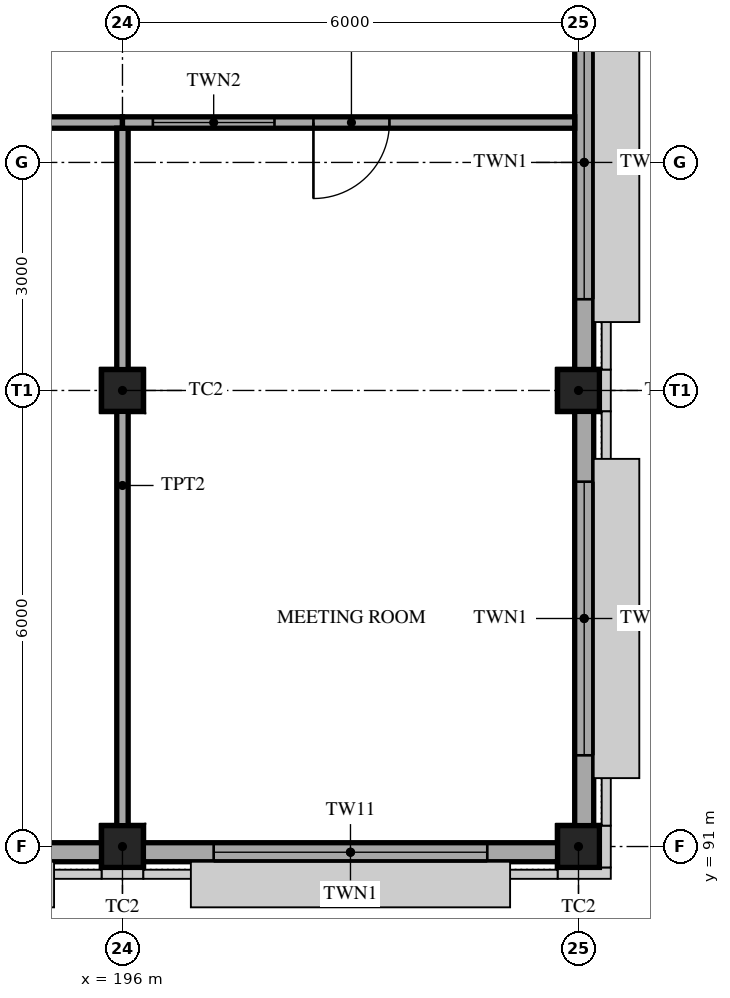
"""IFC4 building model, lengths in metres.
Left out: names, types, materials, properties, quantities, classifications, styles, units other than length and angle.
Written with IfcOpenShell. Run it as: python <this file> out.ifc"""

import sys

from ifc_helpers import new_model, si_unit, direction, frame, frame_2d, origin, origin_2d, place, context, subcontext, project, spatial, polyline, rectangle, hollow_rectangle, outline, extrude, element, fill, save


model = new_model("IFC4")
c1 = context("Model", 3, precision=1e-05, world=origin(), true_north=direction((0.0, 1.0)))
c2 = subcontext(c1, "Body", "Model", "MODEL_VIEW")
j1 = project(units=[si_unit("LENGTHUNIT", "METRE"), si_unit("PLANEANGLEUNIT", "RADIAN")], contexts=[c1])
p1 = place(None, origin())
s1 = spatial("IfcSite", under=j1, at=p1, CompositionType="ELEMENT")
p2 = place(p1, origin())
s2 = spatial("IfcBuilding", under=s1, at=p2, CompositionType="ELEMENT")
p3 = place(p2, frame((0.0, 0.0, 10.0)))
s3 = spatial("IfcBuildingStorey", under=s2, at=p3, CompositionType="ELEMENT", Elevation=10.0)
for number, where, z_axis, x_axis in (
    (1, (196.0, 91.0, 0.0), (0.0, 0.0, 1.0), (1.0, 0.0, 0.0)),
    (2, (202.0, 91.0, 0.0), (0.0, 0.0, 1.0), (1.0, 0.0, 0.0)),
    (3, (202.0, 97.0, 0.0), (0.0, 0.0, 1.0), (1.0, 0.0, 0.0)),
    (4, (196.0, 97.0, 0.0), (0.0, 0.0, 1.0), (1.0, 0.0, 0.0)),
):
    element("IfcColumn", number, at=place(p3, frame(where, z_axis=z_axis, x_axis=x_axis)), inside=s3, PredefinedType="COLUMN", context=c2, shape_type="SweptSolid", body=[
        extrude(hollow_rectangle(XDim=0.55, YDim=0.55, WallThickness=0.032, at=origin_2d()), origin(), (0.0, 0.0, 1.0), 5.0),
    ])
p4 = place(p3, frame((190.275, 90.925, 0.0), z_axis=(0.0, 0.0, 1.0), x_axis=(1.0, 0.0, 0.0)))
e5 = element("IfcWall", 5, at=p4, inside=s3, PredefinedType="SOLIDWALL", context=c2, shape_type="SweptSolid", body=[
    extrude(rectangle(XDim=5.45, YDim=0.25, at=frame_2d((2.725, 0.0))), origin(), (0.0, 0.0, 1.0), 4.35),
])
p5 = place(p4, frame((0.925, 0.0, 0.9)))
e6 = element("IfcOpeningElement", 6, at=p5, cuts=e5, PredefinedType="OPENING", context=c2, shape_type="SweptSolid", body=[
    extrude(rectangle(XDim=3.6, YDim=2.4, at=frame_2d((1.8, 1.2))), frame((0.0, 0.135, 0.0), z_axis=(0.0, -1.0, 0.0), x_axis=(1.0, 0.0, 0.0)), (0.0, 0.0, 1.0), 0.27),
])
p6 = place(p3, frame((196.275, 90.925, 0.0), z_axis=(0.0, 0.0, 1.0), x_axis=(1.0, 0.0, 0.0)))
e7 = element("IfcWall", 7, at=p6, inside=s3, PredefinedType="SOLIDWALL", context=c2, shape_type="SweptSolid", body=[
    extrude(rectangle(XDim=5.45, YDim=0.25, at=frame_2d((2.725, 0.0))), origin(), (0.0, 0.0, 1.0), 4.35),
])
p7 = place(p6, frame((0.925, 0.0, 0.9)))
e8 = element("IfcOpeningElement", 8, at=p7, cuts=e7, PredefinedType="OPENING", context=c2, shape_type="SweptSolid", body=[
    extrude(rectangle(XDim=3.6, YDim=2.4, at=frame_2d((1.8, 1.2))), frame((0.0, 0.135, 0.0), z_axis=(0.0, -1.0, 0.0), x_axis=(1.0, 0.0, 0.0)), (0.0, 0.0, 1.0), 0.27),
])
p8 = place(p3, frame((202.075, 91.275, 0.0), z_axis=(0.0, 0.0, 1.0), x_axis=(0.0, 1.0, 0.0)))
e9 = element("IfcWall", 9, at=p8, inside=s3, PredefinedType="SOLIDWALL", context=c2, shape_type="SweptSolid", body=[
    extrude(rectangle(XDim=5.45, YDim=0.25, at=frame_2d((2.725, 0.0))), origin(), (0.0, 0.0, 1.0), 4.35),
])
p9 = place(p8, frame((0.925, 0.0, 0.9)))
e10 = element("IfcOpeningElement", 10, at=p9, cuts=e9, PredefinedType="OPENING", context=c2, shape_type="SweptSolid", body=[
    extrude(rectangle(XDim=3.6, YDim=2.4, at=frame_2d((1.8, 1.2))), frame((0.0, 0.135, 0.0), z_axis=(0.0, -1.0, 0.0), x_axis=(1.0, 0.0, 0.0)), (0.0, 0.0, 1.0), 0.27),
])
p10 = place(p3, frame((202.075, 97.275, 0.0), z_axis=(0.0, 0.0, 1.0), x_axis=(0.0, 1.0, 0.0)))
e11 = element("IfcWall", 11, at=p10, inside=s3, PredefinedType="SOLIDWALL", context=c2, shape_type="SweptSolid", body=[
    extrude(rectangle(XDim=5.45, YDim=0.25, at=frame_2d((2.725, 0.0))), origin(), (0.0, 0.0, 1.0), 4.35),
])
p11 = place(p10, frame((0.925, 0.0, 0.9)))
e12 = element("IfcOpeningElement", 12, at=p11, cuts=e11, PredefinedType="OPENING", context=c2, shape_type="SweptSolid", body=[
    extrude(rectangle(XDim=3.6, YDim=2.4, at=frame_2d((1.8, 1.2))), frame((0.0, 0.135, 0.0), z_axis=(0.0, -1.0, 0.0), x_axis=(1.0, 0.0, 0.0)), (0.0, 0.0, 1.0), 0.27),
])
p12 = place(p3, frame((190.0, 100.525, 0.0), z_axis=(0.0, 0.0, 1.0), x_axis=(1.0, 0.0, 0.0)))
e13 = element("IfcWall", 13, at=p12, inside=s3, PredefinedType="PARTITIONING", context=c2, shape_type="SweptSolid", body=[
    extrude(rectangle(XDim=6.0, YDim=0.15, at=frame_2d((3.0, 0.0))), origin(), (0.0, 0.0, 1.0), 4.2),
])
p13 = place(p12, frame((0.4, 0.0, 0.9)))
e14 = element("IfcOpeningElement", 14, at=p13, cuts=e13, PredefinedType="OPENING", context=c2, shape_type="SweptSolid", body=[
    extrude(rectangle(XDim=1.6, YDim=1.2, at=frame_2d((0.8, 0.6))), frame((0.0, 0.085, 0.0), z_axis=(0.0, -1.0, 0.0), x_axis=(1.0, 0.0, 0.0)), (0.0, 0.0, 1.0), 0.17),
])
p14 = place(p12, frame((2.5, 0.0, 0.0)))
e15 = element("IfcOpeningElement", 15, at=p14, cuts=e13, PredefinedType="OPENING", context=c2, shape_type="SweptSolid", body=[
    extrude(rectangle(XDim=1.0, YDim=2.1, at=frame_2d((0.5, 1.05))), frame((0.0, 0.085, 0.0), z_axis=(0.0, -1.0, 0.0), x_axis=(1.0, 0.0, 0.0)), (0.0, 0.0, 1.0), 0.17),
])
p15 = place(p3, frame((196.0, 91.05, 0.0), z_axis=(0.0, 0.0, 1.0), x_axis=(0.0, 1.0, 0.0)))
e16 = element("IfcWall", 16, at=p15, inside=s3, PredefinedType="PARTITIONING", context=c2, shape_type="SweptSolid", body=[
    extrude(rectangle(XDim=9.4, YDim=0.15, at=frame_2d((4.7, 0.0))), origin(), (0.0, 0.0, 1.0), 4.2),
])
p16 = place(p3, frame((196.0, 100.525, 0.0), z_axis=(0.0, 0.0, 1.0), x_axis=(1.0, 0.0, 0.0)))
e17 = element("IfcWall", 17, at=p16, inside=s3, PredefinedType="PARTITIONING", context=c2, shape_type="SweptSolid", body=[
    extrude(rectangle(XDim=5.95, YDim=0.15, at=frame_2d((2.975, 0.0))), origin(), (0.0, 0.0, 1.0), 4.2),
])
p17 = place(p16, frame((0.4, 0.0, 0.9)))
e18 = element("IfcOpeningElement", 18, at=p17, cuts=e17, PredefinedType="OPENING", context=c2, shape_type="SweptSolid", body=[
    extrude(rectangle(XDim=1.6, YDim=1.2, at=frame_2d((0.8, 0.6))), frame((0.0, 0.085, 0.0), z_axis=(0.0, -1.0, 0.0), x_axis=(1.0, 0.0, 0.0)), (0.0, 0.0, 1.0), 0.17),
])
p18 = place(p16, frame((2.512, 0.0, 0.0)))
e19 = element("IfcOpeningElement", 19, at=p18, cuts=e17, PredefinedType="OPENING", context=c2, shape_type="SweptSolid", body=[
    extrude(rectangle(XDim=1.0, YDim=2.1, at=frame_2d((0.5, 1.05))), frame((0.0, 0.085, 0.0), z_axis=(0.0, -1.0, 0.0), x_axis=(1.0, 0.0, 0.0)), (0.0, 0.0, 1.0), 0.17),
])
p19 = place(p7, origin())
e20 = element("IfcWindow", 20, at=p19, inside=s3, PartitioningType="TRIPLE_PANEL_VERTICAL", PredefinedType="WINDOW", context=c2, shape_type="SweptSolid", body=[
    extrude(outline(polyline([(0.0, 0.0), (3.6, 0.0), (3.6, 2.4), (0.0, 2.4), (0.0, 0.0)]), holes=[polyline([(0.06, 0.06), (0.96, 0.06), (0.96, 2.34), (0.06, 2.34), (0.06, 0.06)]), polyline([(1.06, 0.06), (2.54, 0.06), (2.54, 2.34), (1.06, 2.34), (1.06, 0.06)]), polyline([(2.64, 0.06), (3.54, 0.06), (3.54, 2.34), (2.64, 2.34), (2.64, 0.06)])]), frame((0.0, 0.03, 0.0), z_axis=(0.0, -1.0, 0.0), x_axis=(1.0, 0.0, 0.0)), (0.0, 0.0, 1.0), 0.06),
    extrude(rectangle(XDim=0.924, YDim=2.304, at=frame_2d((0.51, 1.2))), frame((0.0, 0.01, 0.0), z_axis=(0.0, -1.0, 0.0), x_axis=(1.0, 0.0, 0.0)), (0.0, 0.0, 1.0), 0.02),
    extrude(rectangle(XDim=1.504, YDim=2.304, at=frame_2d((1.8, 1.2))), frame((0.0, 0.01, 0.0), z_axis=(0.0, -1.0, 0.0), x_axis=(1.0, 0.0, 0.0)), (0.0, 0.0, 1.0), 0.02),
    extrude(rectangle(XDim=0.924, YDim=2.304, at=frame_2d((3.09, 1.2))), frame((0.0, 0.01, 0.0), z_axis=(0.0, -1.0, 0.0), x_axis=(1.0, 0.0, 0.0)), (0.0, 0.0, 1.0), 0.02),
])
fill(e8, e20)
p20 = place(p9, origin())
e21 = element("IfcWindow", 21, at=p20, inside=s3, PartitioningType="TRIPLE_PANEL_VERTICAL", PredefinedType="WINDOW", context=c2, shape_type="SweptSolid", body=[
    extrude(outline(polyline([(0.0, 0.0), (3.6, 0.0), (3.6, 2.4), (0.0, 2.4), (0.0, 0.0)]), holes=[polyline([(0.06, 0.06), (0.96, 0.06), (0.96, 2.34), (0.06, 2.34), (0.06, 0.06)]), polyline([(1.06, 0.06), (2.54, 0.06), (2.54, 2.34), (1.06, 2.34), (1.06, 0.06)]), polyline([(2.64, 0.06), (3.54, 0.06), (3.54, 2.34), (2.64, 2.34), (2.64, 0.06)])]), frame((0.0, 0.03, 0.0), z_axis=(0.0, -1.0, 0.0), x_axis=(1.0, 0.0, 0.0)), (0.0, 0.0, 1.0), 0.06),
    extrude(rectangle(XDim=0.924, YDim=2.304, at=frame_2d((0.51, 1.2))), frame((0.0, 0.01, 0.0), z_axis=(0.0, -1.0, 0.0), x_axis=(1.0, 0.0, 0.0)), (0.0, 0.0, 1.0), 0.02),
    extrude(rectangle(XDim=1.504, YDim=2.304, at=frame_2d((1.8, 1.2))), frame((0.0, 0.01, 0.0), z_axis=(0.0, -1.0, 0.0), x_axis=(1.0, 0.0, 0.0)), (0.0, 0.0, 1.0), 0.02),
    extrude(rectangle(XDim=0.924, YDim=2.304, at=frame_2d((3.09, 1.2))), frame((0.0, 0.01, 0.0), z_axis=(0.0, -1.0, 0.0), x_axis=(1.0, 0.0, 0.0)), (0.0, 0.0, 1.0), 0.02),
])
fill(e10, e21)
p21 = place(p11, origin())
e22 = element("IfcWindow", 22, at=p21, inside=s3, PartitioningType="TRIPLE_PANEL_VERTICAL", PredefinedType="WINDOW", context=c2, shape_type="SweptSolid", body=[
    extrude(outline(polyline([(0.0, 0.0), (3.6, 0.0), (3.6, 2.4), (0.0, 2.4), (0.0, 0.0)]), holes=[polyline([(0.06, 0.06), (0.96, 0.06), (0.96, 2.34), (0.06, 2.34), (0.06, 0.06)]), polyline([(1.06, 0.06), (2.54, 0.06), (2.54, 2.34), (1.06, 2.34), (1.06, 0.06)]), polyline([(2.64, 0.06), (3.54, 0.06), (3.54, 2.34), (2.64, 2.34), (2.64, 0.06)])]), frame((0.0, 0.03, 0.0), z_axis=(0.0, -1.0, 0.0), x_axis=(1.0, 0.0, 0.0)), (0.0, 0.0, 1.0), 0.06),
    extrude(rectangle(XDim=0.924, YDim=2.304, at=frame_2d((0.51, 1.2))), frame((0.0, 0.01, 0.0), z_axis=(0.0, -1.0, 0.0), x_axis=(1.0, 0.0, 0.0)), (0.0, 0.0, 1.0), 0.02),
    extrude(rectangle(XDim=1.504, YDim=2.304, at=frame_2d((1.8, 1.2))), frame((0.0, 0.01, 0.0), z_axis=(0.0, -1.0, 0.0), x_axis=(1.0, 0.0, 0.0)), (0.0, 0.0, 1.0), 0.02),
    extrude(rectangle(XDim=0.924, YDim=2.304, at=frame_2d((3.09, 1.2))), frame((0.0, 0.01, 0.0), z_axis=(0.0, -1.0, 0.0), x_axis=(1.0, 0.0, 0.0)), (0.0, 0.0, 1.0), 0.02),
])
fill(e12, e22)
p22 = place(p17, origin())
e23 = element("IfcWindow", 23, at=p22, inside=s3, PartitioningType="SINGLE_PANEL", PredefinedType="WINDOW", context=c2, shape_type="SweptSolid", body=[
    extrude(rectangle(XDim=1.6, YDim=1.2, at=frame_2d((0.8, 0.6))), frame((0.0, 0.03, 0.0), z_axis=(0.0, -1.0, 0.0), x_axis=(1.0, 0.0, 0.0)), (0.0, 0.0, 1.0), 0.06),
])
fill(e18, e23)
p23 = place(p18, frame((1.0, 0.0, 0.0), z_axis=(0.0, 0.0, 1.0), x_axis=(-1.0, 0.0, 0.0)))
e24 = element("IfcDoor", 24, at=p23, inside=s3, OperationType="SINGLE_SWING_RIGHT", PredefinedType="DOOR", context=c2, shape_type="SweptSolid", body=[
    extrude(rectangle(XDim=1.0, YDim=2.1, at=frame_2d((0.5, 1.05))), frame((0.0, 0.025, 0.0), z_axis=(0.0, -1.0, 0.0), x_axis=(1.0, 0.0, 0.0)), (0.0, 0.0, 1.0), 0.05),
])
fill(e19, e24)
save(model, sys.argv[1])
